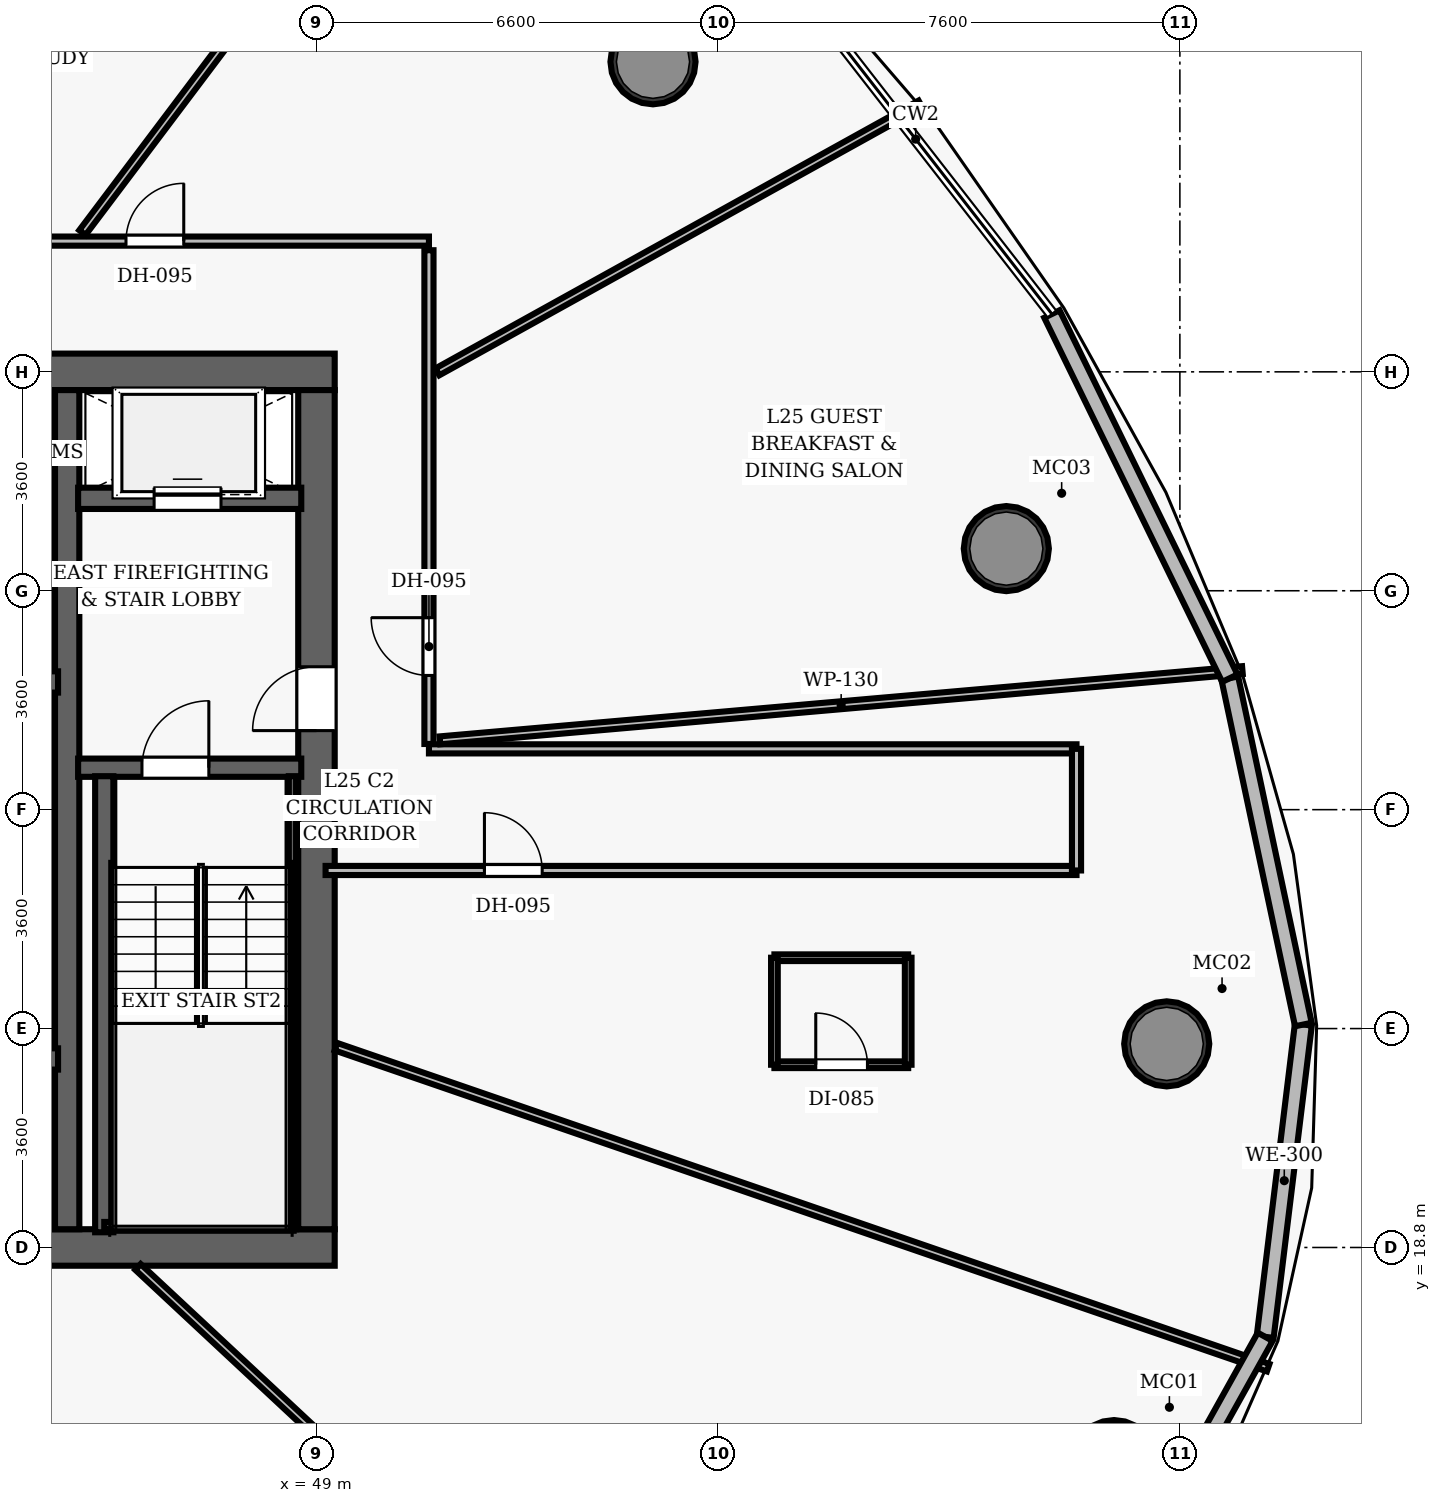
"""IFC4 building model, lengths in metres.
Left out: names, types, materials, properties, quantities, classifications, styles, units other than length and angle.
Written with IfcOpenShell. Run it as: python <this file> out.ifc"""

import sys

from ifc_helpers import new_model, si_unit, direction, frame, frame_2d, origin, origin_2d, place, context, subcontext, project, spatial, rectangle, hollow_circle, extrude, element, fill, save


model = new_model("IFC4")
c1 = context("Model", 3, precision=1e-05, world=origin(), true_north=direction((0.0, 1.0)))
c2 = subcontext(c1, "Body", "Model", "MODEL_VIEW")
j1 = project(units=[si_unit("LENGTHUNIT", "METRE"), si_unit("PLANEANGLEUNIT", "RADIAN")], contexts=[c1])
p1 = place(None, origin())
s1 = spatial("IfcSite", under=j1, at=p1, CompositionType="ELEMENT")
p2 = place(p1, origin())
s2 = spatial("IfcBuilding", under=s1, at=p2, CompositionType="ELEMENT")
p3 = place(p2, frame((0.0, 0.0, 106.3)))
s3 = spatial("IfcBuildingStorey", under=s2, at=p3, CompositionType="ELEMENT", Elevation=106.3)
p4 = place(p3, frame((26.7, 18.8, 0.0), z_axis=(0.0, 0.0, 1.0), x_axis=(1.0, 0.0, 0.0)))
e1 = element("IfcWall", 1, at=p4, inside=s3, PredefinedType="SHEAR", context=c2, shape_type="SweptSolid", body=[
    extrude(rectangle(XDim=22.6, YDim=0.6, at=frame_2d((11.3, 0.0))), origin(), (0.0, 0.0, 1.0), 3.5),
])
p5 = place(p4, frame((14.52, 0.0, 0.0)))
e2 = element("IfcOpeningElement", 2, at=p5, cuts=e1, PredefinedType="OPENING", context=c2, shape_type="SweptSolid", body=[
    extrude(rectangle(XDim=1.05, YDim=2.15, at=frame_2d((0.525, 1.075))), frame((0.0, 0.31, 0.0), z_axis=(0.0, -1.0, 0.0), x_axis=(1.0, 0.0, 0.0)), (0.0, 0.0, 1.0), 0.62),
])
p6 = place(p3, frame((26.7, 33.2, 0.0), z_axis=(0.0, 0.0, 1.0), x_axis=(1.0, 0.0, 0.0)))
e3 = element("IfcWall", 3, at=p6, inside=s3, PredefinedType="SHEAR", context=c2, shape_type="SweptSolid", body=[
    extrude(rectangle(XDim=22.6, YDim=0.6, at=frame_2d((11.3, 0.0))), origin(), (0.0, 0.0, 1.0), 3.5),
])
p7 = place(p6, frame((4.62, 0.0, 0.0)))
e4 = element("IfcOpeningElement", 4, at=p7, cuts=e3, PredefinedType="OPENING", context=c2, shape_type="SweptSolid", body=[
    extrude(rectangle(XDim=1.05, YDim=2.15, at=frame_2d((0.525, 1.075))), frame((0.0, 0.31, 0.0), z_axis=(0.0, -1.0, 0.0), x_axis=(1.0, 0.0, 0.0)), (0.0, 0.0, 1.0), 0.62),
])
p8 = place(p6, frame((14.52, 0.0, 0.0)))
e5 = element("IfcOpeningElement", 5, at=p8, cuts=e3, PredefinedType="OPENING", context=c2, shape_type="SweptSolid", body=[
    extrude(rectangle(XDim=1.05, YDim=2.15, at=frame_2d((0.525, 1.075))), frame((0.0, 0.31, 0.0), z_axis=(0.0, -1.0, 0.0), x_axis=(1.0, 0.0, 0.0)), (0.0, 0.0, 1.0), 0.62),
])
p9 = place(p3, frame((49.0, 19.1, 0.0), z_axis=(0.0, 0.0, 1.0), x_axis=(0.0, 1.0, 0.0)))
e6 = element("IfcWall", 6, at=p9, inside=s3, PredefinedType="SHEAR", context=c2, shape_type="SweptSolid", body=[
    extrude(rectangle(XDim=13.8, YDim=0.6, at=frame_2d((6.9, 0.0))), origin(), (0.0, 0.0, 1.0), 3.5),
])
p10 = place(p9, frame((8.2, 0.0, 0.0)))
e7 = element("IfcOpeningElement", 7, at=p10, cuts=e6, PredefinedType="OPENING", context=c2, shape_type="SweptSolid", body=[
    extrude(rectangle(XDim=1.05, YDim=2.15, at=frame_2d((0.525, 1.075))), frame((0.0, 0.31, 0.0), z_axis=(0.0, -1.0, 0.0), x_axis=(1.0, 0.0, 0.0)), (0.0, 0.0, 1.0), 0.62),
])
p11 = place(p3, frame((44.9, 19.1, 0.0), z_axis=(0.0, 0.0, 1.0), x_axis=(0.0, 1.0, 0.0)))
e8 = element("IfcWall", 8, at=p11, inside=s3, PredefinedType="SHEAR", context=c2, shape_type="SweptSolid", body=[
    extrude(rectangle(XDim=13.8, YDim=0.4, at=frame_2d((6.9, 0.0))), origin(), (0.0, 0.0, 1.0), 3.5),
])
for number, where, z_axis, x_axis in (
    (9, (62.118, 15.262, 0.0), (0.0, 0.0, 1.0), (1.0, 0.0, 0.0)),
    (10, (62.984, 22.148, 0.0), (0.0, 0.0, 1.0), (1.0, 0.0, 0.0)),
    (11, (60.346, 30.293, 0.0), (0.0, 0.0, 1.0), (1.0, 0.0, 0.0)),
    (12, (54.535, 38.299, 0.0), (0.0, 0.0, 1.0), (1.0, 0.0, 0.0)),
):
    element("IfcColumn", number, at=place(p3, frame(where, z_axis=z_axis, x_axis=x_axis)), inside=s3, PredefinedType="COLUMN", context=c2, shape_type="SweptSolid", body=[
        extrude(hollow_circle(Radius=0.7, WallThickness=0.055, at=origin_2d()), origin(), (0.0, 0.0, 1.0), 3.5),
    ])
p12 = place(p3, frame((45.08, 26.69, 0.0), z_axis=(0.0, 0.0, 1.0), x_axis=(1.0, 0.0, 0.0)))
e13 = element("IfcWall", 13, at=p12, inside=s3, PredefinedType="SHEAR", context=c2, shape_type="SweptSolid", body=[
    extrude(rectangle(XDim=3.67, YDim=0.3, at=frame_2d((1.835, 0.0))), origin(), (0.0, 0.0, 1.0), 3.5),
])
p13 = place(p12, frame((1.05, 0.0, 0.0)))
e14 = element("IfcOpeningElement", 14, at=p13, cuts=e13, PredefinedType="OPENING", context=c2, shape_type="SweptSolid", body=[
    extrude(rectangle(XDim=1.1, YDim=2.15, at=frame_2d((0.55, 1.075))), frame((0.0, 0.16, 0.0), z_axis=(0.0, -1.0, 0.0), x_axis=(1.0, 0.0, 0.0)), (0.0, 0.0, 1.0), 0.32),
])
p14 = place(p3, frame((45.51, 19.05, 0.0), z_axis=(0.0, 0.0, 1.0), x_axis=(0.0, 1.0, 0.0)))
e15 = element("IfcWall", 15, at=p14, inside=s3, PredefinedType="SHEAR", context=c2, shape_type="SweptSolid", body=[
    extrude(rectangle(XDim=7.5, YDim=0.3, at=frame_2d((3.75, 0.0))), origin(), (0.0, 0.0, 1.0), 3.5),
])
p15 = place(p3, frame((48.605, 19.1, 0.0), z_axis=(0.0, 0.0, 1.0), x_axis=(0.0, 1.0, 0.0)))
e16 = element("IfcWall", 16, at=p15, inside=s3, PredefinedType="SHEAR", context=c2, shape_type="SweptSolid", body=[
    extrude(rectangle(XDim=7.45, YDim=0.12, at=frame_2d((3.725, 0.0))), origin(), (0.0, 0.0, 1.0), 3.5),
])
p16 = place(p3, frame((45.51, 19.16, 0.0), z_axis=(0.0, 0.0, 1.0), x_axis=(1.0, 0.0, 0.0)))
e17 = element("IfcWall", 17, at=p16, inside=s3, PredefinedType="SHEAR", context=c2, shape_type="SweptSolid", body=[
    extrude(rectangle(XDim=3.095, YDim=0.12, at=frame_2d((1.547, 0.0))), origin(), (0.0, 0.0, 1.0), 3.5),
])
p17 = place(p3, frame((45.08, 31.12, 0.0), z_axis=(0.0, 0.0, 1.0), x_axis=(1.0, 0.0, 0.0)))
e18 = element("IfcWall", 18, at=p17, inside=s3, PredefinedType="SHEAR", context=c2, shape_type="SweptSolid", body=[
    extrude(rectangle(XDim=3.67, YDim=0.35, at=frame_2d((1.835, 0.0))), origin(), (0.0, 0.0, 1.0), 2.675),
])
p18 = place(p17, frame((1.25, 0.0, 0.0)))
e19 = element("IfcOpeningElement", 19, at=p18, cuts=e18, PredefinedType="OPENING", context=c2, shape_type="SweptSolid", body=[
    extrude(rectangle(XDim=1.1, YDim=2.15, at=frame_2d((0.55, 1.075))), frame((0.0, 0.185, 0.0), z_axis=(0.0, -1.0, 0.0), x_axis=(1.0, 0.0, 0.0)), (0.0, 0.0, 1.0), 0.37),
])
for number, where, z_axis, x_axis in (
    (20, (42.72, 21.9, 0.0), (0.0, 0.0, 1.0), (1.0, 0.0, 0.0)),
    (21, (42.72, 28.1, 0.0), (0.0, 0.0, 1.0), (1.0, 0.0, 0.0)),
):
    element("IfcWall", number, at=place(p3, frame(where, z_axis=z_axis, x_axis=x_axis)), inside=s3, PredefinedType="SHEAR", context=c2, shape_type="SweptSolid", body=[
        extrude(rectangle(XDim=2.03, YDim=0.35, at=frame_2d((1.015, 0.0))), origin(), (0.0, 0.0, 1.0), 2.675),
    ])
p19 = place(p3, frame((24.85, 35.35, 0.0), z_axis=(0.0, 0.0, 1.0), x_axis=(1.0, 0.0, 0.0)))
e22 = element("IfcWall", 22, at=p19, inside=s3, PredefinedType="PARTITIONING", context=c2, shape_type="SweptSolid", body=[
    extrude(rectangle(XDim=26.0, YDim=0.15, at=frame_2d((13.0, 0.0))), origin(), (0.0, 0.0, 1.0), 2.675),
])
p20 = place(p19, frame((21.017, 0.0, 0.0)))
e23 = element("IfcOpeningElement", 23, at=p20, cuts=e22, PredefinedType="OPENING", context=c2, shape_type="SweptSolid", body=[
    extrude(rectangle(XDim=0.95, YDim=2.15, at=frame_2d((0.475, 1.075))), frame((0.0, 0.085, 0.0), z_axis=(0.0, -1.0, 0.0), x_axis=(1.0, 0.0, 0.0)), (0.0, 0.0, 1.0), 0.17),
])
p21 = place(p19, frame((15.954, 0.0, 0.0)))
e24 = element("IfcOpeningElement", 24, at=p21, cuts=e22, PredefinedType="OPENING", context=c2, shape_type="SweptSolid", body=[
    extrude(rectangle(XDim=0.95, YDim=2.15, at=frame_2d((0.475, 1.075))), frame((0.0, 0.085, 0.0), z_axis=(0.0, -1.0, 0.0), x_axis=(1.0, 0.0, 0.0)), (0.0, 0.0, 1.0), 0.17),
])
p22 = place(p19, frame((12.155, 0.0, 0.0)))
e25 = element("IfcOpeningElement", 25, at=p22, cuts=e22, PredefinedType="OPENING", context=c2, shape_type="SweptSolid", body=[
    extrude(rectangle(XDim=0.95, YDim=2.15, at=frame_2d((0.475, 1.075))), frame((0.0, 0.085, 0.0), z_axis=(0.0, -1.0, 0.0), x_axis=(1.0, 0.0, 0.0)), (0.0, 0.0, 1.0), 0.17),
])
p23 = place(p19, frame((7.086, 0.0, 0.0)))
e26 = element("IfcOpeningElement", 26, at=p23, cuts=e22, PredefinedType="OPENING", context=c2, shape_type="SweptSolid", body=[
    extrude(rectangle(XDim=0.95, YDim=2.15, at=frame_2d((0.475, 1.075))), frame((0.0, 0.085, 0.0), z_axis=(0.0, -1.0, 0.0), x_axis=(1.0, 0.0, 0.0)), (0.0, 0.0, 1.0), 0.17),
])
p24 = place(p19, frame((4.637, 0.0, 0.0)))
e27 = element("IfcOpeningElement", 27, at=p24, cuts=e22, PredefinedType="OPENING", context=c2, shape_type="SweptSolid", body=[
    extrude(rectangle(XDim=0.95, YDim=2.15, at=frame_2d((0.475, 1.075))), frame((0.0, 0.085, 0.0), z_axis=(0.0, -1.0, 0.0), x_axis=(1.0, 0.0, 0.0)), (0.0, 0.0, 1.0), 0.17),
])
p25 = place(p3, frame((50.85, 27.08, 0.0), z_axis=(0.0, 0.0, 1.0), x_axis=(0.0, 1.0, 0.0)))
e28 = element("IfcWall", 28, at=p25, inside=s3, PredefinedType="PARTITIONING", context=c2, shape_type="SweptSolid", body=[
    extrude(rectangle(XDim=8.12, YDim=0.15, at=frame_2d((4.06, 0.0))), origin(), (0.0, 0.0, 1.0), 2.675),
])
p26 = place(p25, frame((1.127, 0.0, 0.0)))
e29 = element("IfcOpeningElement", 29, at=p26, cuts=e28, PredefinedType="OPENING", context=c2, shape_type="SweptSolid", body=[
    extrude(rectangle(XDim=0.95, YDim=2.15, at=frame_2d((0.475, 1.075))), frame((0.0, 0.085, 0.0), z_axis=(0.0, -1.0, 0.0), x_axis=(1.0, 0.0, 0.0)), (0.0, 0.0, 1.0), 0.17),
])
p27 = place(p3, frame((50.85, 27.0, 0.0), z_axis=(0.0, 0.0, 1.0), x_axis=(1.0, 0.0, 0.0)))
e30 = element("IfcWall", 30, at=p27, inside=s3, PredefinedType="PARTITIONING", context=c2, shape_type="SweptSolid", body=[
    extrude(rectangle(XDim=10.65, YDim=0.15, at=frame_2d((5.325, 0.0))), origin(), (0.0, 0.0, 1.0), 2.675),
])
p28 = place(p3, frame((49.15, 25.0, 0.0), z_axis=(0.0, 0.0, 1.0), x_axis=(1.0, 0.0, 0.0)))
e31 = element("IfcWall", 31, at=p28, inside=s3, PredefinedType="PARTITIONING", context=c2, shape_type="SweptSolid", body=[
    extrude(rectangle(XDim=12.35, YDim=0.15, at=frame_2d((6.175, 0.0))), origin(), (0.0, 0.0, 1.0), 2.675),
])
p29 = place(p28, frame((2.613, 0.0, 0.0)))
e32 = element("IfcOpeningElement", 32, at=p29, cuts=e31, PredefinedType="OPENING", context=c2, shape_type="SweptSolid", body=[
    extrude(rectangle(XDim=0.95, YDim=2.15, at=frame_2d((0.475, 1.075))), frame((0.0, 0.085, 0.0), z_axis=(0.0, -1.0, 0.0), x_axis=(1.0, 0.0, 0.0)), (0.0, 0.0, 1.0), 0.17),
])
p30 = place(p3, frame((61.5, 25.0, 0.0), z_axis=(0.0, 0.0, 1.0), x_axis=(0.0, 1.0, 0.0)))
e33 = element("IfcWall", 33, at=p30, inside=s3, PredefinedType="PARTITIONING", context=c2, shape_type="SweptSolid", body=[
    extrude(rectangle(XDim=2.0, YDim=0.15, at=frame_2d((1.0, 0.0))), origin(), (0.0, 0.0, 1.0), 2.675),
])
p31 = place(p3, frame((51.03, 27.14, 0.0), z_axis=(0.0, 0.0, 1.0), x_axis=(0.996194117526, 0.087162378392, 0.0)))
e34 = element("IfcWall", 34, at=p31, inside=s3, PredefinedType="PARTITIONING", context=c2, shape_type="SweptSolid", body=[
    extrude(rectangle(XDim=13.249, YDim=0.13, at=frame_2d((6.625, 0.0))), origin(), (0.0, 0.0, 1.0), 2.675),
])
p32 = place(p3, frame((50.99, 33.2, 0.0), z_axis=(0.0, 0.0, 1.0), x_axis=(0.874615857377, 0.484816565337, 0.0)))
e35 = element("IfcWall", 35, at=p32, inside=s3, PredefinedType="PARTITIONING", context=c2, shape_type="SweptSolid", body=[
    extrude(rectangle(XDim=9.083, YDim=0.13, at=frame_2d((4.542, 0.0))), origin(), (0.0, 0.0, 1.0), 2.675),
])
p33 = place(p3, frame((45.151, 35.49, 0.0), z_axis=(0.0, 0.0, 1.0), x_axis=(0.601822667406, 0.798629749632, 0.0)))
e36 = element("IfcWall", 36, at=p33, inside=s3, PredefinedType="PARTITIONING", context=c2, shape_type="SweptSolid", body=[
    extrude(rectangle(XDim=11.049, YDim=0.13, at=frame_2d((5.525, 0.0))), origin(), (0.0, 0.0, 1.0), 2.675),
])
p34 = place(p3, frame((42.028, 16.51, 0.0), z_axis=(0.0, 0.0, 1.0), x_axis=(0.390724326838, -0.920507740552, 0.0)))
e37 = element("IfcWall", 37, at=p34, inside=s3, PredefinedType="PARTITIONING", context=c2, shape_type="SweptSolid", body=[
    extrude(rectangle(XDim=13.475, YDim=0.13, at=frame_2d((6.737, 0.0))), origin(), (0.0, 0.0, 1.0), 2.675),
])
p35 = place(p3, frame((46.064, 18.48, 0.0), z_axis=(0.0, 0.0, 1.0), x_axis=(0.73135803083, -0.681993717523, 0.0)))
e38 = element("IfcWall", 38, at=p35, inside=s3, PredefinedType="PARTITIONING", context=c2, shape_type="SweptSolid", body=[
    extrude(rectangle(XDim=15.04, YDim=0.13, at=frame_2d((7.52, 0.0))), origin(), (0.0, 0.0, 1.0), 2.675),
])
p36 = place(p3, frame((49.32, 22.102, 0.0), z_axis=(0.0, 0.0, 1.0), x_axis=(0.945519124535, -0.325566560229, 0.0)))
e39 = element("IfcWall", 39, at=p36, inside=s3, PredefinedType="PARTITIONING", context=c2, shape_type="SweptSolid", body=[
    extrude(rectangle(XDim=16.216, YDim=0.13, at=frame_2d((8.108, 0.0))), origin(), (0.0, 0.0, 1.0), 2.675),
])
p37 = place(p3, frame((56.532, 21.805, 0.0), z_axis=(0.0, 0.0, 1.0), x_axis=(1.0, 0.0, 0.0)))
e40 = element("IfcWall", 40, at=p37, inside=s3, PredefinedType="PARTITIONING", context=c2, shape_type="SweptSolid", body=[
    extrude(rectangle(XDim=2.2, YDim=0.11, at=frame_2d((1.1, 0.0))), origin(), (0.0, 0.0, 1.0), 2.675),
])
p38 = place(p37, frame((0.68, 0.0, 0.0)))
e41 = element("IfcOpeningElement", 41, at=p38, cuts=e40, PredefinedType="OPENING", context=c2, shape_type="SweptSolid", body=[
    extrude(rectangle(XDim=0.85, YDim=2.1, at=frame_2d((0.425, 1.05))), frame((0.0, 0.065, 0.0), z_axis=(0.0, -1.0, 0.0), x_axis=(1.0, 0.0, 0.0)), (0.0, 0.0, 1.0), 0.13),
])
p39 = place(p3, frame((56.532, 23.565, 0.0), z_axis=(0.0, 0.0, 1.0), x_axis=(1.0, 0.0, 0.0)))
e42 = element("IfcWall", 42, at=p39, inside=s3, PredefinedType="PARTITIONING", context=c2, shape_type="SweptSolid", body=[
    extrude(rectangle(XDim=2.2, YDim=0.11, at=frame_2d((1.1, 0.0))), origin(), (0.0, 0.0, 1.0), 2.675),
])
for number, where, z_axis, x_axis in (
    (43, (56.532, 21.805, 0.0), (0.0, 0.0, 1.0), (0.0, 1.0, 0.0)),
    (44, (58.732, 21.805, 0.0), (0.0, 0.0, 1.0), (0.0, 1.0, 0.0)),
):
    element("IfcWall", number, at=place(p3, frame(where, z_axis=z_axis, x_axis=x_axis)), inside=s3, PredefinedType="PARTITIONING", context=c2, shape_type="SweptSolid", body=[
        extrude(rectangle(XDim=1.76, YDim=0.11, at=frame_2d((0.88, 0.0))), origin(), (0.0, 0.0, 1.0), 2.675),
    ])
p40 = place(p3, frame((65.231, 22.467, 0.0), z_axis=(0.0, 0.0, 1.0), x_axis=(-0.121357138015, -0.992608908409, 0.0)))
e45 = element("IfcWall", 45, at=p40, inside=s3, PredefinedType="SOLIDWALL", context=c2, shape_type="SweptSolid", body=[
    extrude(rectangle(XDim=5.174, YDim=0.28, at=frame_2d((2.587, 0.0))), origin(), (0.0, 0.0, 1.0), 3.26),
])
p41 = place(p3, frame((64.021, 28.162, 0.0), z_axis=(0.0, 0.0, 1.0), x_axis=(0.207761969704, -0.978179412963, 0.0)))
e46 = element("IfcWall", 46, at=p41, inside=s3, PredefinedType="SOLIDWALL", context=c2, shape_type="SweptSolid", body=[
    extrude(rectangle(XDim=5.823, YDim=0.28, at=frame_2d((2.911, 0.0))), origin(), (0.0, 0.0, 1.0), 3.26),
])
p42 = place(p3, frame((61.095, 34.151, 0.0), z_axis=(0.0, 0.0, 1.0), x_axis=(0.438960472237, -0.89850637383, 0.0)))
e47 = element("IfcWall", 47, at=p42, inside=s3, PredefinedType="SOLIDWALL", context=c2, shape_type="SweptSolid", body=[
    extrude(rectangle(XDim=6.665, YDim=0.28, at=frame_2d((3.333, 0.0))), origin(), (0.0, 0.0, 1.0), 3.26),
])
p43 = place(p3, frame((64.603, 17.331, 0.0), z_axis=(0.0, 0.0, 1.0), x_axis=(-0.486776225007, -0.873526706385, 0.0)))
e48 = element("IfcWall", 48, at=p43, inside=s3, PredefinedType="SOLIDWALL", context=c2, shape_type="SweptSolid", body=[
    extrude(rectangle(XDim=5.175, YDim=0.28, at=frame_2d((2.587, 0.0))), origin(), (0.0, 0.0, 1.0), 3.26),
])
p44 = place(p13, origin())
e49 = element("IfcDoor", 49, at=p44, inside=s3, OperationType="SINGLE_SWING_RIGHT", PredefinedType="DOOR", context=c2, shape_type="SweptSolid", body=[
    extrude(rectangle(XDim=1.1, YDim=2.15, at=frame_2d((0.55, 1.075))), frame((0.0, 0.025, 0.0), z_axis=(0.0, -1.0, 0.0), x_axis=(1.0, 0.0, 0.0)), (0.0, 0.0, 1.0), 0.05),
])
fill(e14, e49)
p45 = place(p10, origin())
e50 = element("IfcDoor", 50, at=p45, inside=s3, OperationType="SINGLE_SWING_LEFT", PredefinedType="DOOR", context=c2, shape_type="SweptSolid", body=[
    extrude(rectangle(XDim=1.05, YDim=2.15, at=frame_2d((0.525, 1.075))), frame((0.0, 0.025, 0.0), z_axis=(0.0, -1.0, 0.0), x_axis=(1.0, 0.0, 0.0)), (0.0, 0.0, 1.0), 0.05),
])
fill(e7, e50)
p46 = place(p26, origin())
e51 = element("IfcDoor", 51, at=p46, inside=s3, OperationType="SINGLE_SWING_RIGHT", PredefinedType="DOOR", context=c2, shape_type="SweptSolid", body=[
    extrude(rectangle(XDim=0.95, YDim=2.15, at=frame_2d((0.475, 1.075))), frame((0.0, 0.025, 0.0), z_axis=(0.0, -1.0, 0.0), x_axis=(1.0, 0.0, 0.0)), (0.0, 0.0, 1.0), 0.05),
])
fill(e29, e51)
p47 = place(p20, origin())
e52 = element("IfcDoor", 52, at=p47, inside=s3, OperationType="SINGLE_SWING_RIGHT", PredefinedType="DOOR", context=c2, shape_type="SweptSolid", body=[
    extrude(rectangle(XDim=0.95, YDim=2.15, at=frame_2d((0.475, 1.075))), frame((0.0, 0.025, 0.0), z_axis=(0.0, -1.0, 0.0), x_axis=(1.0, 0.0, 0.0)), (0.0, 0.0, 1.0), 0.05),
])
fill(e23, e52)
p48 = place(p29, origin())
e53 = element("IfcDoor", 53, at=p48, inside=s3, OperationType="SINGLE_SWING_LEFT", PredefinedType="DOOR", context=c2, shape_type="SweptSolid", body=[
    extrude(rectangle(XDim=0.95, YDim=2.15, at=frame_2d((0.475, 1.075))), frame((0.0, 0.025, 0.0), z_axis=(0.0, -1.0, 0.0), x_axis=(1.0, 0.0, 0.0)), (0.0, 0.0, 1.0), 0.05),
])
fill(e32, e53)
p49 = place(p38, origin())
e54 = element("IfcDoor", 54, at=p49, inside=s3, OperationType="SINGLE_SWING_LEFT", PredefinedType="DOOR", context=c2, shape_type="SweptSolid", body=[
    extrude(rectangle(XDim=0.85, YDim=2.1, at=frame_2d((0.425, 1.05))), frame((0.0, 0.025, 0.0), z_axis=(0.0, -1.0, 0.0), x_axis=(1.0, 0.0, 0.0)), (0.0, 0.0, 1.0), 0.05),
])
fill(e41, e54)
p50 = place(p18, origin())
e55 = element("IfcDoor", 55, at=p50, inside=s3, OperationType="SLIDING_TO_LEFT", PredefinedType="DOOR", context=c2, shape_type="SweptSolid", body=[
    extrude(rectangle(XDim=1.1, YDim=2.15, at=frame_2d((0.55, 1.075))), frame((0.0, 0.025, 0.0), z_axis=(0.0, -1.0, 0.0), x_axis=(1.0, 0.0, 0.0)), (0.0, 0.0, 1.0), 0.05),
])
fill(e19, e55)
save(model, sys.argv[1])
